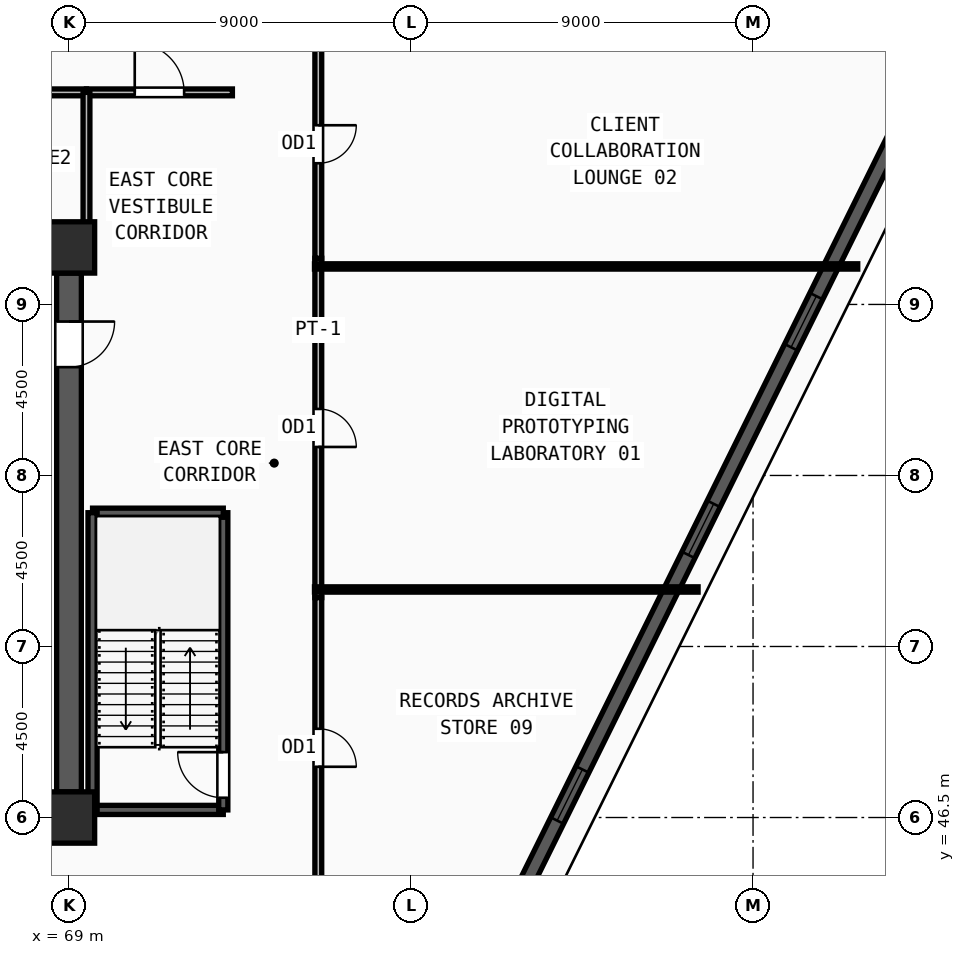
"""IFC4 building model, lengths in metres.
Left out: names, types, materials, properties, quantities, classifications, styles, units other than length and angle.
Written with IfcOpenShell. Run it as: python <this file> out.ifc"""

import sys

from ifc_helpers import new_model, si_unit, direction, frame, frame_2d, origin, origin_2d, place, context, subcontext, project, spatial, rectangle, extrude, source, transform, mapped, element, fill, save


model = new_model("IFC4")
c1 = context("Model", 3, precision=1e-05, world=origin(), true_north=direction((0.0, 1.0)))
c2 = subcontext(c1, "Body", "Model", "MODEL_VIEW")
j1 = project(units=[si_unit("LENGTHUNIT", "METRE"), si_unit("PLANEANGLEUNIT", "RADIAN")], contexts=[c1])
p1 = place(None, origin())
s1 = spatial("IfcSite", under=j1, at=p1, CompositionType="ELEMENT")
p2 = place(p1, origin())
s2 = spatial("IfcBuilding", under=s1, at=p2, CompositionType="ELEMENT")
p3 = place(p2, frame((0.0, 0.0, 258.75)))
s3 = spatial("IfcBuildingStorey", under=s2, at=p3, CompositionType="ELEMENT", Elevation=258.75)
m1 = source(origin(), c2, "Body", "SweptSolid", [
    extrude(rectangle(XDim=1.35, YDim=1.35, at=origin_2d()), origin(), (0.0, 0.0, 1.0), 3.75),
])
for number, where, z_axis, x_axis in (
    (1, (69.0, 46.5, 0.0), (0.0, 0.0, 1.0), (1.0, 0.0, 0.0)),
    (2, (69.0, 61.5, 0.0), (0.0, 0.0, 1.0), (1.0, 0.0, 0.0)),
):
    element("IfcColumn", number, at=place(p3, frame(where, z_axis=z_axis, x_axis=x_axis)), inside=s3, PredefinedType="COLUMN", context=c2, shape_type="MappedRepresentation", body=[
        mapped(m1, transform((0.0, 0.0, 0.0), x_axis=(1.0, 0.0, 0.0), y_axis=(0.0, 1.0, 0.0), z_axis=(0.0, 0.0, 1.0), scale=1.0)),
    ])
p4 = place(p3, frame((79.1, 40.865, 0.0), z_axis=(0.0, 0.0, 1.0), x_axis=(0.44309993188, 0.896472225096, 0.0)))
e3 = element("IfcWall", 3, at=p4, inside=s3, PredefinedType="SOLIDWALL", context=c2, shape_type="SweptSolid", body=[
    extrude(rectangle(XDim=27.783, YDim=0.38, at=frame_2d((13.892, 0.0))), origin(), (0.0, 0.0, 1.0), 3.57),
])
m2 = source(origin(), c2, "Body", "SweptSolid", [
    extrude(rectangle(XDim=1.5, YDim=1.9, at=frame_2d((0.75, 0.95))), frame((0.0, 0.2, 0.0), z_axis=(0.0, -1.0, 0.0), x_axis=(1.0, 0.0, 0.0)), (0.0, 0.0, 1.0), 0.4),
])
p5 = place(p4, frame((6.196, 0.0, 0.55)))
e4 = element("IfcOpeningElement", 4, at=p5, cuts=e3, PredefinedType="OPENING", context=c2, shape_type="MappedRepresentation", body=[
    mapped(m2, transform((0.0, 0.0, 0.0), x_axis=(1.0, 0.0, 0.0), y_axis=(0.0, 1.0, 0.0), z_axis=(0.0, 0.0, 1.0), scale=1.0)),
])
p6 = place(p4, frame((13.992, 0.0, 0.55)))
e5 = element("IfcOpeningElement", 5, at=p6, cuts=e3, PredefinedType="OPENING", context=c2, shape_type="MappedRepresentation", body=[
    mapped(m2, transform((0.0, 0.0, 0.0), x_axis=(1.0, 0.0, 0.0), y_axis=(0.0, 1.0, 0.0), z_axis=(0.0, 0.0, 1.0), scale=1.0)),
])
p7 = place(p4, frame((20.088, 0.0, 0.55)))
e6 = element("IfcOpeningElement", 6, at=p7, cuts=e3, PredefinedType="OPENING", context=c2, shape_type="MappedRepresentation", body=[
    mapped(m2, transform((0.0, 0.0, 0.0), x_axis=(1.0, 0.0, 0.0), y_axis=(0.0, 1.0, 0.0), z_axis=(0.0, 0.0, 1.0), scale=1.0)),
])
p8 = place(p3, frame((91.259, 66.769, 0.0), z_axis=(0.0, 0.0, 1.0), x_axis=(-0.689420989275, 0.724360890404, 0.0)))
e7 = element("IfcWall", 7, at=p8, inside=s3, PredefinedType="SOLIDWALL", context=c2, shape_type="SweptSolid", body=[
    extrude(rectangle(XDim=4.088, YDim=0.38, at=frame_2d((2.044, 0.0))), origin(), (0.0, 0.0, 1.0), 3.57),
])
p9 = place(p3, frame((69.0, 60.825, 0.0), z_axis=(0.0, 0.0, 1.0), x_axis=(0.0, -1.0, 0.0)))
e8 = element("IfcWall", 8, at=p9, inside=s3, PredefinedType="SHEAR", context=c2, shape_type="SweptSolid", body=[
    extrude(rectangle(XDim=13.65, YDim=0.65, at=frame_2d((6.825, 0.0))), origin(), (0.0, 0.0, 1.0), 3.57),
])
m3 = source(origin(), c2, "Body", "SweptSolid", [
    extrude(rectangle(XDim=1.2, YDim=2.2, at=frame_2d((0.6, 1.1))), frame((0.0, 0.335, 0.0), z_axis=(0.0, -1.0, 0.0), x_axis=(1.0, 0.0, 0.0)), (0.0, 0.0, 1.0), 0.67),
])
p10 = place(p9, frame((1.275, 0.0, 0.0)))
e9 = element("IfcOpeningElement", 9, at=p10, cuts=e8, PredefinedType="OPENING", context=c2, shape_type="MappedRepresentation", body=[
    mapped(m3, transform((0.0, 0.0, 0.0), x_axis=(1.0, 0.0, 0.0), y_axis=(0.0, 1.0, 0.0), z_axis=(0.0, 0.0, 1.0), scale=1.0)),
])
p11 = place(p3, frame((69.62, 46.7, 0.0), z_axis=(0.0, 0.0, 1.0), x_axis=(1.0, 0.0, 0.0)))
e10 = element("IfcWall", 10, at=p11, inside=s3, PredefinedType="SOLIDWALL", context=c2, shape_type="SweptSolid", body=[
    extrude(rectangle(XDim=3.44, YDim=0.24, at=frame_2d((1.72, 0.0))), origin(), (0.0, 0.0, 1.0), 3.57),
])
p12 = place(p3, frame((73.06, 46.7, 0.0), z_axis=(0.0, 0.0, 1.0), x_axis=(0.0, 1.0, 0.0)))
e11 = element("IfcWall", 11, at=p12, inside=s3, PredefinedType="SOLIDWALL", context=c2, shape_type="SweptSolid", body=[
    extrude(rectangle(XDim=7.82, YDim=0.24, at=frame_2d((3.91, 0.0))), origin(), (0.0, 0.0, 1.0), 3.57),
])
m4 = source(origin(), c2, "Body", "SweptSolid", [
    extrude(rectangle(XDim=1.2, YDim=2.2, at=frame_2d((0.6, 1.1))), frame((0.0, 0.13, 0.0), z_axis=(0.0, -1.0, 0.0), x_axis=(1.0, 0.0, 0.0)), (0.0, 0.0, 1.0), 0.26),
])
p13 = place(p12, frame((0.32, 0.0, 0.0)))
e12 = element("IfcOpeningElement", 12, at=p13, cuts=e11, PredefinedType="OPENING", context=c2, shape_type="MappedRepresentation", body=[
    mapped(m4, transform((0.0, 0.0, 0.0), x_axis=(1.0, 0.0, 0.0), y_axis=(0.0, 1.0, 0.0), z_axis=(0.0, 0.0, 1.0), scale=1.0)),
])
p14 = place(p3, frame((73.06, 54.52, 0.0), z_axis=(0.0, 0.0, 1.0), x_axis=(-1.0, 0.0, 0.0)))
e13 = element("IfcWall", 13, at=p14, inside=s3, PredefinedType="SOLIDWALL", context=c2, shape_type="SweptSolid", body=[
    extrude(rectangle(XDim=3.44, YDim=0.24, at=frame_2d((1.72, 0.0))), origin(), (0.0, 0.0, 1.0), 3.57),
])
p15 = place(p3, frame((69.62, 54.52, 0.0), z_axis=(0.0, 0.0, 1.0), x_axis=(0.0, -1.0, 0.0)))
e14 = element("IfcWall", 14, at=p15, inside=s3, PredefinedType="SOLIDWALL", context=c2, shape_type="SweptSolid", body=[
    extrude(rectangle(XDim=7.82, YDim=0.24, at=frame_2d((3.91, 0.0))), origin(), (0.0, 0.0, 1.0), 3.57),
])
p16 = place(p3, frame((65.92, 65.58, 0.0), z_axis=(0.0, 0.0, 1.0), x_axis=(1.0, 0.0, 0.0)))
e15 = element("IfcWall", 15, at=p16, inside=s3, PredefinedType="PARTITIONING", context=c2, shape_type="SweptSolid", body=[
    extrude(rectangle(XDim=3.54, YDim=0.18, at=frame_2d((1.77, 0.0))), origin(), (0.0, 0.0, 1.0), 3.57),
])
m5 = source(origin(), c2, "Body", "SweptSolid", [
    extrude(rectangle(XDim=1.0, YDim=2.2, at=frame_2d((0.5, 1.1))), frame((0.0, 0.1, 0.0), z_axis=(0.0, -1.0, 0.0), x_axis=(1.0, 0.0, 0.0)), (0.0, 0.0, 1.0), 0.2),
])
p17 = place(p16, frame((1.27, 0.0, 0.0)))
e16 = element("IfcOpeningElement", 16, at=p17, cuts=e15, PredefinedType="OPENING", context=c2, shape_type="MappedRepresentation", body=[
    mapped(m5, transform((0.0, 0.0, 0.0), x_axis=(1.0, 0.0, 0.0), y_axis=(0.0, 1.0, 0.0), z_axis=(0.0, 0.0, 1.0), scale=1.0)),
])
p18 = place(p3, frame((69.46, 65.58, 0.0), z_axis=(0.0, 0.0, 1.0), x_axis=(1.0, 0.0, 0.0)))
e17 = element("IfcWall", 17, at=p18, inside=s3, PredefinedType="PARTITIONING", context=c2, shape_type="SweptSolid", body=[
    extrude(rectangle(XDim=3.84, YDim=0.18, at=frame_2d((1.92, 0.0))), origin(), (0.0, 0.0, 1.0), 3.57),
])
m6 = source(origin(), c2, "Body", "SweptSolid", [
    extrude(rectangle(XDim=1.3, YDim=2.2, at=frame_2d((0.65, 1.1))), frame((0.0, 0.1, 0.0), z_axis=(0.0, -1.0, 0.0), x_axis=(1.0, 0.0, 0.0)), (0.0, 0.0, 1.0), 0.2),
])
p19 = place(p18, frame((1.27, 0.0, 0.0)))
e18 = element("IfcOpeningElement", 18, at=p19, cuts=e17, PredefinedType="OPENING", context=c2, shape_type="MappedRepresentation", body=[
    mapped(m6, transform((0.0, 0.0, 0.0), x_axis=(1.0, 0.0, 0.0), y_axis=(0.0, 1.0, 0.0), z_axis=(0.0, 0.0, 1.0), scale=1.0)),
])
p20 = place(p3, frame((75.56, 61.215, 0.0), z_axis=(0.0, 0.0, 1.0), x_axis=(0.0, -1.0, 0.0)))
e19 = element("IfcWall", 19, at=p20, inside=s3, PredefinedType="PARTITIONING", context=c2, shape_type="SweptSolid", body=[
    extrude(rectangle(XDim=8.93, YDim=0.18, at=frame_2d((4.465, 0.0))), origin(), (0.0, 0.0, 1.0), 3.57),
])
p21 = place(p20, frame((3.965, 0.0, 0.0)))
e20 = element("IfcOpeningElement", 20, at=p21, cuts=e19, PredefinedType="OPENING", context=c2, shape_type="MappedRepresentation", body=[
    mapped(m5, transform((0.0, 0.0, 0.0), x_axis=(1.0, 0.0, 0.0), y_axis=(0.0, 1.0, 0.0), z_axis=(0.0, 0.0, 1.0), scale=1.0)),
])
p22 = place(p3, frame((75.56, 67.215, 0.0), z_axis=(0.0, 0.0, 1.0), x_axis=(0.0, -1.0, 0.0)))
e21 = element("IfcWall", 21, at=p22, inside=s3, PredefinedType="PARTITIONING", context=c2, shape_type="SweptSolid", body=[
    extrude(rectangle(XDim=6.0, YDim=0.18, at=frame_2d((3.0, 0.0))), origin(), (0.0, 0.0, 1.0), 3.57),
])
p23 = place(p22, frame((2.5, 0.0, 0.0)))
e22 = element("IfcOpeningElement", 22, at=p23, cuts=e21, PredefinedType="OPENING", context=c2, shape_type="MappedRepresentation", body=[
    mapped(m5, transform((0.0, 0.0, 0.0), x_axis=(1.0, 0.0, 0.0), y_axis=(0.0, 1.0, 0.0), z_axis=(0.0, 0.0, 1.0), scale=1.0)),
])
p24 = place(p3, frame((75.56, 52.285, 0.0), z_axis=(0.0, 0.0, 1.0), x_axis=(0.0, -1.0, 0.0)))
e23 = element("IfcWall", 23, at=p24, inside=s3, PredefinedType="PARTITIONING", context=c2, shape_type="SweptSolid", body=[
    extrude(rectangle(XDim=7.9, YDim=0.18, at=frame_2d((3.95, 0.0))), origin(), (0.0, 0.0, 1.0), 3.57),
])
p25 = place(p24, frame((3.45, 0.0, 0.0)))
e24 = element("IfcOpeningElement", 24, at=p25, cuts=e23, PredefinedType="OPENING", context=c2, shape_type="MappedRepresentation", body=[
    mapped(m5, transform((0.0, 0.0, 0.0), x_axis=(1.0, 0.0, 0.0), y_axis=(0.0, 1.0, 0.0), z_axis=(0.0, 0.0, 1.0), scale=1.0)),
])
p26 = place(p3, frame((69.46, 61.95, 0.0), z_axis=(0.0, 0.0, 1.0), x_axis=(0.0, 1.0, 0.0)))
e25 = element("IfcWall", 25, at=p26, inside=s3, PredefinedType="PARTITIONING", context=c2, shape_type="SweptSolid", body=[
    extrude(rectangle(XDim=3.63, YDim=0.18, at=frame_2d((1.815, 0.0))), origin(), (0.0, 0.0, 1.0), 3.57),
])
p27 = place(p3, frame((75.46, 52.5, 0.0), z_axis=(0.0, 0.0, 1.0), x_axis=(1.0, 0.0, 0.0)))
e26 = element("IfcWall", 26, at=p27, inside=s3, PredefinedType="PARTITIONING", context=c2, shape_type="SweptSolid", body=[
    extrude(rectangle(XDim=10.094, YDim=0.14, at=frame_2d((5.047, 0.0))), origin(), (0.0, 0.0, 1.0), 3.57),
])
p28 = place(p3, frame((75.46, 61.0, 0.0), z_axis=(0.0, 0.0, 1.0), x_axis=(1.0, 0.0, 0.0)))
e27 = element("IfcWall", 27, at=p28, inside=s3, PredefinedType="PARTITIONING", context=c2, shape_type="SweptSolid", body=[
    extrude(rectangle(XDim=14.295, YDim=0.14, at=frame_2d((7.147, 0.0))), origin(), (0.0, 0.0, 1.0), 3.57),
])
m7 = source(origin(), c2, "Body", "SweptSolid", [
    extrude(rectangle(XDim=1.5, YDim=1.9, at=frame_2d((0.75, 0.95))), frame((0.0, 0.03, 0.0), z_axis=(0.0, -1.0, 0.0), x_axis=(1.0, 0.0, 0.0)), (0.0, 0.0, 1.0), 0.06),
])
p29 = place(p5, origin())
e28 = element("IfcWindow", 28, at=p29, inside=s3, PartitioningType="DOUBLE_PANEL_VERTICAL", PredefinedType="WINDOW", context=c2, shape_type="MappedRepresentation", body=[
    mapped(m7, transform((0.0, 0.0, 0.0), x_axis=(1.0, 0.0, 0.0), y_axis=(0.0, 1.0, 0.0), z_axis=(0.0, 0.0, 1.0), scale=1.0)),
])
fill(e4, e28)
p30 = place(p6, origin())
e29 = element("IfcWindow", 29, at=p30, inside=s3, PartitioningType="DOUBLE_PANEL_VERTICAL", PredefinedType="WINDOW", context=c2, shape_type="MappedRepresentation", body=[
    mapped(m7, transform((0.0, 0.0, 0.0), x_axis=(1.0, 0.0, 0.0), y_axis=(0.0, 1.0, 0.0), z_axis=(0.0, 0.0, 1.0), scale=1.0)),
])
fill(e5, e29)
p31 = place(p7, origin())
e30 = element("IfcWindow", 30, at=p31, inside=s3, PartitioningType="DOUBLE_PANEL_VERTICAL", PredefinedType="WINDOW", context=c2, shape_type="MappedRepresentation", body=[
    mapped(m7, transform((0.0, 0.0, 0.0), x_axis=(1.0, 0.0, 0.0), y_axis=(0.0, 1.0, 0.0), z_axis=(0.0, 0.0, 1.0), scale=1.0)),
])
fill(e6, e30)
m8 = source(origin(), c2, "Body", "SweptSolid", [
    extrude(rectangle(XDim=1.2, YDim=2.2, at=frame_2d((0.6, 1.1))), frame((0.0, 0.025, 0.0), z_axis=(0.0, -1.0, 0.0), x_axis=(1.0, 0.0, 0.0)), (0.0, 0.0, 1.0), 0.05),
])
p32 = place(p10, origin())
e31 = element("IfcDoor", 31, at=p32, inside=s3, OperationType="SINGLE_SWING_LEFT", PredefinedType="DOOR", context=c2, shape_type="MappedRepresentation", body=[
    mapped(m8, transform((0.0, 0.0, 0.0), x_axis=(1.0, 0.0, 0.0), y_axis=(0.0, 1.0, 0.0), z_axis=(0.0, 0.0, 1.0), scale=1.0)),
])
fill(e9, e31)
p33 = place(p13, origin())
e32 = element("IfcDoor", 32, at=p33, inside=s3, OperationType="SINGLE_SWING_RIGHT", PredefinedType="DOOR", context=c2, shape_type="MappedRepresentation", body=[
    mapped(m8, transform((0.0, 0.0, 0.0), x_axis=(1.0, 0.0, 0.0), y_axis=(0.0, 1.0, 0.0), z_axis=(0.0, 0.0, 1.0), scale=1.0)),
])
fill(e12, e32)
m9 = source(origin(), c2, "Body", "SweptSolid", [
    extrude(rectangle(XDim=1.3, YDim=2.2, at=frame_2d((0.65, 1.1))), frame((0.0, 0.025, 0.0), z_axis=(0.0, -1.0, 0.0), x_axis=(1.0, 0.0, 0.0)), (0.0, 0.0, 1.0), 0.05),
])
p34 = place(p19, origin())
e33 = element("IfcDoor", 33, at=p34, inside=s3, OperationType="SINGLE_SWING_LEFT", PredefinedType="DOOR", context=c2, shape_type="MappedRepresentation", body=[
    mapped(m9, transform((0.0, 0.0, 0.0), x_axis=(1.0, 0.0, 0.0), y_axis=(0.0, 1.0, 0.0), z_axis=(0.0, 0.0, 1.0), scale=1.0)),
])
fill(e18, e33)
m10 = source(origin(), c2, "Body", "SweptSolid", [
    extrude(rectangle(XDim=1.0, YDim=2.2, at=frame_2d((0.5, 1.1))), frame((0.0, 0.025, 0.0), z_axis=(0.0, -1.0, 0.0), x_axis=(1.0, 0.0, 0.0)), (0.0, 0.0, 1.0), 0.05),
])
p35 = place(p21, origin())
e34 = element("IfcDoor", 34, at=p35, inside=s3, OperationType="SINGLE_SWING_RIGHT", PredefinedType="DOOR", context=c2, shape_type="MappedRepresentation", body=[
    mapped(m10, transform((0.0, 0.0, 0.0), x_axis=(1.0, 0.0, 0.0), y_axis=(0.0, 1.0, 0.0), z_axis=(0.0, 0.0, 1.0), scale=1.0)),
])
fill(e20, e34)
p36 = place(p23, origin())
e35 = element("IfcDoor", 35, at=p36, inside=s3, OperationType="SINGLE_SWING_LEFT", PredefinedType="DOOR", context=c2, shape_type="MappedRepresentation", body=[
    mapped(m10, transform((0.0, 0.0, 0.0), x_axis=(1.0, 0.0, 0.0), y_axis=(0.0, 1.0, 0.0), z_axis=(0.0, 0.0, 1.0), scale=1.0)),
])
fill(e22, e35)
p37 = place(p25, origin())
e36 = element("IfcDoor", 36, at=p37, inside=s3, OperationType="SINGLE_SWING_RIGHT", PredefinedType="DOOR", context=c2, shape_type="MappedRepresentation", body=[
    mapped(m10, transform((0.0, 0.0, 0.0), x_axis=(1.0, 0.0, 0.0), y_axis=(0.0, 1.0, 0.0), z_axis=(0.0, 0.0, 1.0), scale=1.0)),
])
fill(e24, e36)
save(model, sys.argv[1])
